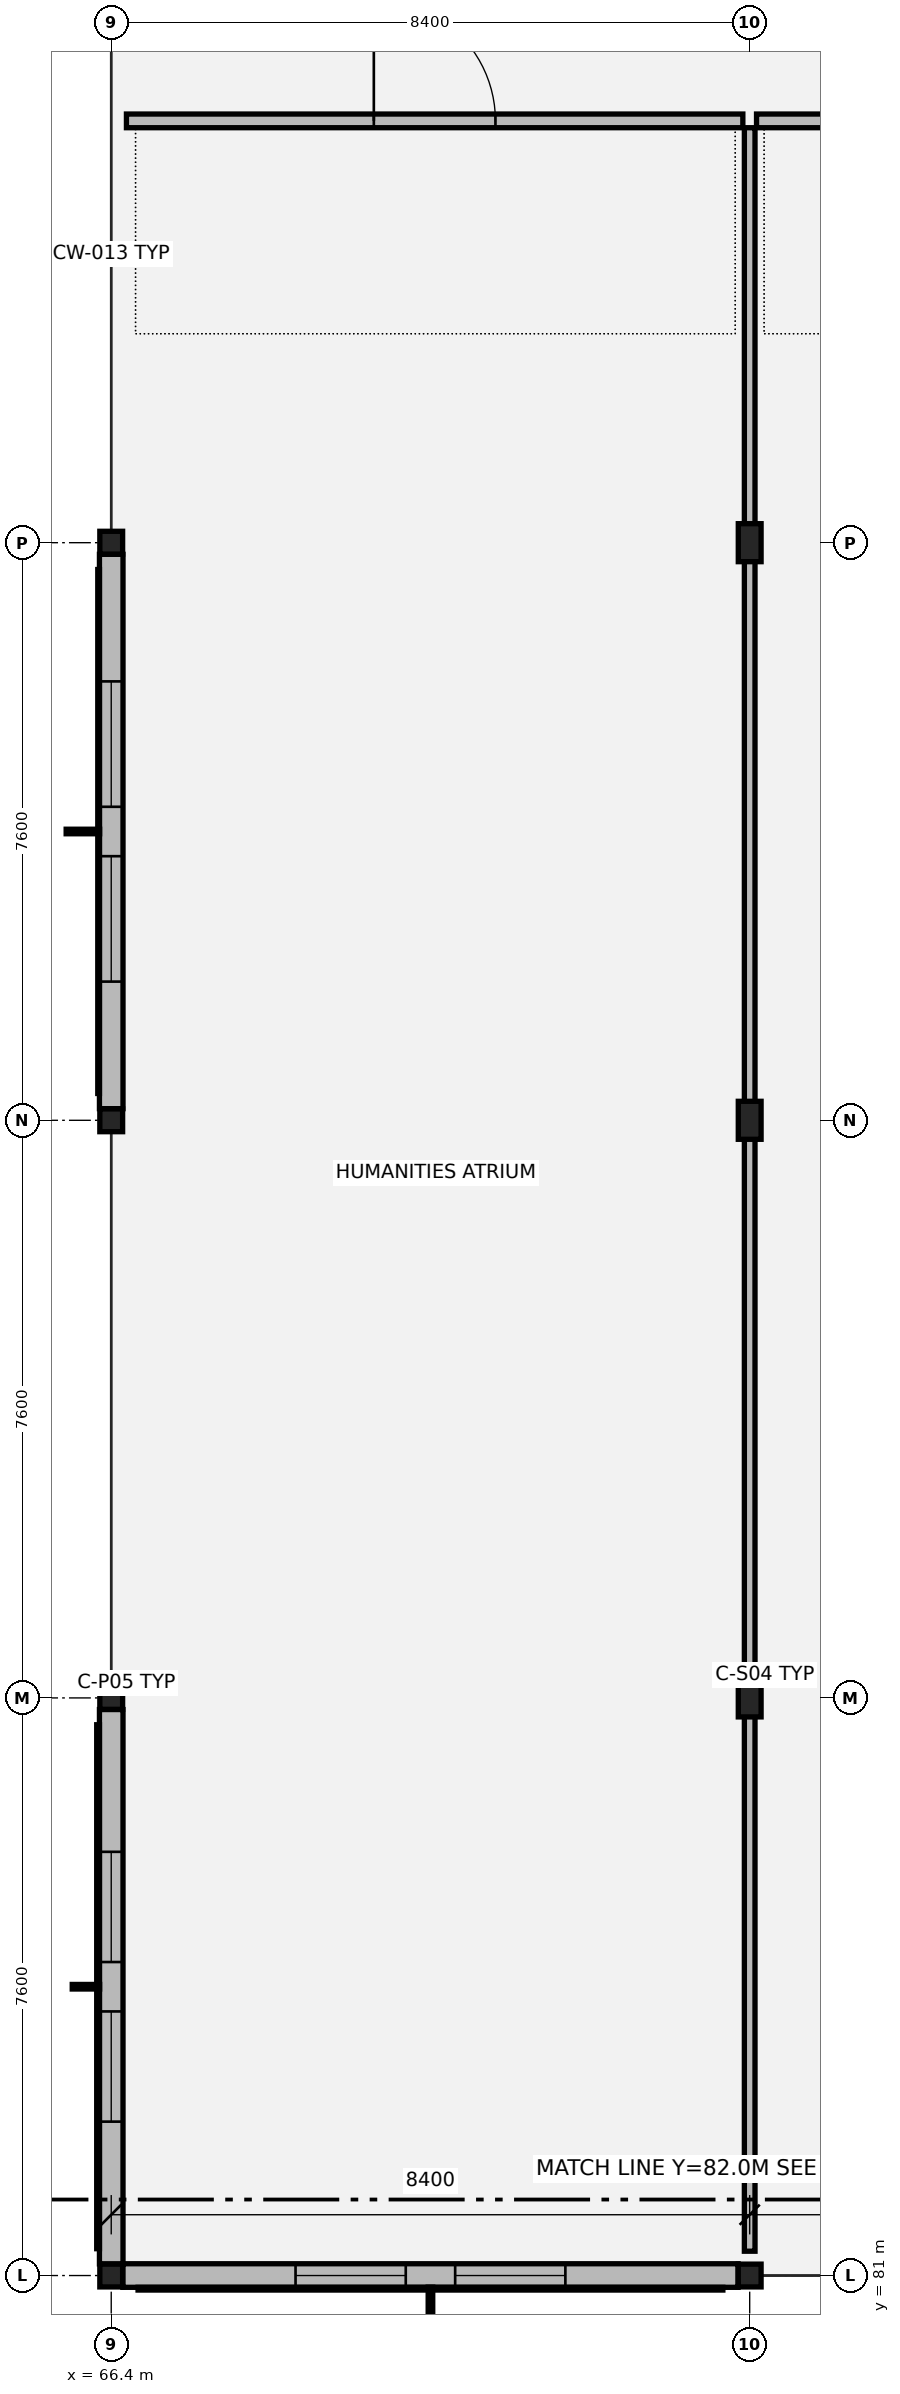
"""IFC4 building model, lengths in metres.
Left out: names, types, materials, properties, quantities, classifications, styles, units other than length and angle.
Written with IfcOpenShell. Run it as: python <this file> out.ifc"""

import sys

from ifc_helpers import new_model, si_unit, direction, frame, frame_2d, origin, origin_2d, place, context, subcontext, project, spatial, rectangle, hollow_rectangle, i_section, extrude, element, fill, save


model = new_model("IFC4")
c1 = context("Model", 3, precision=1e-05, world=origin(), true_north=direction((0.0, 1.0)))
c2 = subcontext(c1, "Body", "Model", "MODEL_VIEW")
j1 = project(units=[si_unit("LENGTHUNIT", "METRE"), si_unit("PLANEANGLEUNIT", "RADIAN")], contexts=[c1])
p1 = place(None, origin())
s1 = spatial("IfcSite", under=j1, at=p1, CompositionType="ELEMENT")
p2 = place(p1, origin())
s2 = spatial("IfcBuilding", under=s1, at=p2, CompositionType="ELEMENT")
p3 = place(p2, frame((0.0, 0.0, 5.1)))
s3 = spatial("IfcBuildingStorey", under=s2, at=p3, CompositionType="ELEMENT", Elevation=5.1)
for number, where, z_axis, x_axis in (
    (1, (66.4, 81.0, 0.0), (0.0, 0.0, 1.0), (1.0, 0.0, 0.0)),
    (2, (66.4, 88.6, 0.0), (0.0, 0.0, 1.0), (1.0, 0.0, 0.0)),
    (3, (66.4, 96.2, 0.0), (0.0, 0.0, 1.0), (1.0, 0.0, 0.0)),
    (4, (66.4, 103.8, 0.0), (0.0, 0.0, 1.0), (1.0, 0.0, 0.0)),
    (5, (74.8, 81.0, 0.0), (0.0, 0.0, 1.0), (1.0, 0.0, 0.0)),
):
    element("IfcColumn", number, at=place(p3, frame(where, z_axis=z_axis, x_axis=x_axis)), inside=s3, PredefinedType="COLUMN", context=c2, shape_type="SweptSolid", body=[
        extrude(hollow_rectangle(XDim=0.3, YDim=0.3, WallThickness=0.012, at=origin_2d()), origin(), (0.0, 0.0, 1.0), 4.055),
    ])
for number, where, z_axis, x_axis in (
    (6, (74.8, 88.6, 0.0), (0.0, 0.0, 1.0), (1.0, 0.0, 0.0)),
    (7, (74.8, 96.2, 0.0), (0.0, 0.0, 1.0), (1.0, 0.0, 0.0)),
    (8, (74.8, 103.8, 0.0), (0.0, 0.0, 1.0), (1.0, 0.0, 0.0)),
):
    element("IfcColumn", number, at=place(p3, frame(where, z_axis=z_axis, x_axis=x_axis)), inside=s3, PredefinedType="COLUMN", context=c2, shape_type="SweptSolid", body=[
        extrude(i_section(OverallWidth=0.3, OverallDepth=0.5, WebThickness=0.014, FlangeThickness=0.028, at=origin_2d()), origin(), (0.0, 0.0, 1.0), 4.055),
    ])
p4 = place(p3, frame((66.553, 81.0, 0.0), z_axis=(0.0, 0.0, 1.0), x_axis=(1.0, 0.0, 0.0)))
e9 = element("IfcWall", 9, at=p4, inside=s3, PredefinedType="SOLIDWALL", context=c2, shape_type="SweptSolid", body=[
    extrude(rectangle(XDim=8.094, YDim=0.31, at=frame_2d((4.047, 0.0))), origin(), (0.0, 0.0, 1.0), 3.48),
])
p5 = place(p4, frame((2.272, 0.0, 0.8)))
e10 = element("IfcOpeningElement", 10, at=p5, cuts=e9, PredefinedType="OPENING", context=c2, shape_type="SweptSolid", body=[
    extrude(rectangle(XDim=1.45, YDim=2.2, at=frame_2d((0.725, 1.1))), frame((0.0, 0.165, 0.0), z_axis=(0.0, -1.0, 0.0), x_axis=(1.0, 0.0, 0.0)), (0.0, 0.0, 1.0), 0.33),
])
p6 = place(p4, frame((4.372, 0.0, 0.8)))
e11 = element("IfcOpeningElement", 11, at=p6, cuts=e9, PredefinedType="OPENING", context=c2, shape_type="SweptSolid", body=[
    extrude(rectangle(XDim=1.45, YDim=2.2, at=frame_2d((0.725, 1.1))), frame((0.0, 0.165, 0.0), z_axis=(0.0, -1.0, 0.0), x_axis=(1.0, 0.0, 0.0)), (0.0, 0.0, 1.0), 0.33),
])
p7 = place(p3, frame((66.4, 103.647, 0.0), z_axis=(0.0, 0.0, 1.0), x_axis=(0.0, -1.0, 0.0)))
e12 = element("IfcWall", 12, at=p7, inside=s3, PredefinedType="SOLIDWALL", context=c2, shape_type="SweptSolid", body=[
    extrude(rectangle(XDim=7.294, YDim=0.31, at=frame_2d((3.647, 0.0))), origin(), (0.0, 0.0, 1.0), 3.48),
])
p8 = place(p7, frame((1.672, 0.0, 0.8)))
e13 = element("IfcOpeningElement", 13, at=p8, cuts=e12, PredefinedType="OPENING", context=c2, shape_type="SweptSolid", body=[
    extrude(rectangle(XDim=1.65, YDim=2.25, at=frame_2d((0.825, 1.125))), frame((0.0, 0.165, 0.0), z_axis=(0.0, -1.0, 0.0), x_axis=(1.0, 0.0, 0.0)), (0.0, 0.0, 1.0), 0.33),
])
p9 = place(p7, frame((3.972, 0.0, 0.8)))
e14 = element("IfcOpeningElement", 14, at=p9, cuts=e12, PredefinedType="OPENING", context=c2, shape_type="SweptSolid", body=[
    extrude(rectangle(XDim=1.65, YDim=2.25, at=frame_2d((0.825, 1.125))), frame((0.0, 0.165, 0.0), z_axis=(0.0, -1.0, 0.0), x_axis=(1.0, 0.0, 0.0)), (0.0, 0.0, 1.0), 0.33),
])
p10 = place(p3, frame((66.4, 88.447, 0.0), z_axis=(0.0, 0.0, 1.0), x_axis=(0.0, -1.0, 0.0)))
e15 = element("IfcWall", 15, at=p10, inside=s3, PredefinedType="SOLIDWALL", context=c2, shape_type="SweptSolid", body=[
    extrude(rectangle(XDim=7.294, YDim=0.31, at=frame_2d((3.647, 0.0))), origin(), (0.0, 0.0, 1.0), 3.48),
])
p11 = place(p10, frame((1.872, 0.0, 0.8)))
e16 = element("IfcOpeningElement", 16, at=p11, cuts=e15, PredefinedType="OPENING", context=c2, shape_type="SweptSolid", body=[
    extrude(rectangle(XDim=1.45, YDim=2.2, at=frame_2d((0.725, 1.1))), frame((0.0, 0.165, 0.0), z_axis=(0.0, -1.0, 0.0), x_axis=(1.0, 0.0, 0.0)), (0.0, 0.0, 1.0), 0.33),
])
p12 = place(p10, frame((3.972, 0.0, 0.8)))
e17 = element("IfcOpeningElement", 17, at=p12, cuts=e15, PredefinedType="OPENING", context=c2, shape_type="SweptSolid", body=[
    extrude(rectangle(XDim=1.45, YDim=2.2, at=frame_2d((0.725, 1.1))), frame((0.0, 0.165, 0.0), z_axis=(0.0, -1.0, 0.0), x_axis=(1.0, 0.0, 0.0)), (0.0, 0.0, 1.0), 0.33),
])
p13 = place(p3, frame((66.6, 109.35, 0.0), z_axis=(0.0, 0.0, 1.0), x_axis=(1.0, 0.0, 0.0)))
e18 = element("IfcWall", 18, at=p13, inside=s3, PredefinedType="PARTITIONING", context=c2, shape_type="SweptSolid", body=[
    extrude(rectangle(XDim=8.11, YDim=0.18, at=frame_2d((4.055, 0.0))), origin(), (0.0, 0.0, 1.0), 3.18),
])
p14 = place(p13, frame((3.255, 0.0, 0.0)))
e19 = element("IfcOpeningElement", 19, at=p14, cuts=e18, PredefinedType="OPENING", context=c2, shape_type="SweptSolid", body=[
    extrude(rectangle(XDim=1.6, YDim=2.25, at=frame_2d((0.8, 1.125))), frame((0.0, 0.1, 0.0), z_axis=(0.0, -1.0, 0.0), x_axis=(1.0, 0.0, 0.0)), (0.0, 0.0, 1.0), 0.2),
])
p15 = place(p3, frame((74.89, 109.35, 0.0), z_axis=(0.0, 0.0, 1.0), x_axis=(1.0, 0.0, 0.0)))
e20 = element("IfcWall", 20, at=p15, inside=s3, PredefinedType="PARTITIONING", context=c2, shape_type="SweptSolid", body=[
    extrude(rectangle(XDim=16.62, YDim=0.18, at=frame_2d((8.31, 0.0))), origin(), (0.0, 0.0, 1.0), 3.18),
])
p16 = place(p15, frame((7.63, 0.0, 0.0)))
e21 = element("IfcOpeningElement", 21, at=p16, cuts=e20, PredefinedType="OPENING", context=c2, shape_type="SweptSolid", body=[
    extrude(rectangle(XDim=1.36, YDim=2.2, at=frame_2d((0.68, 1.1))), frame((0.0, 0.1, 0.0), z_axis=(0.0, -1.0, 0.0), x_axis=(1.0, 0.0, 0.0)), (0.0, 0.0, 1.0), 0.2),
])
p17 = place(p3, frame((74.8, 81.32, 0.0), z_axis=(0.0, 0.0, 1.0), x_axis=(0.0, 1.0, 0.0)))
e22 = element("IfcWall", 22, at=p17, inside=s3, PredefinedType="PARTITIONING", context=c2, shape_type="SweptSolid", body=[
    extrude(rectangle(XDim=27.94, YDim=0.14, at=frame_2d((13.97, 0.0))), origin(), (0.0, 0.0, 1.0), 3.18),
])
p18 = place(p5, origin())
e23 = element("IfcWindow", 23, at=p18, inside=s3, PartitioningType="SINGLE_PANEL", PredefinedType="WINDOW", context=c2, shape_type="SweptSolid", body=[
    extrude(rectangle(XDim=1.45, YDim=2.2, at=frame_2d((0.725, 1.1))), frame((0.0, 0.03, 0.0), z_axis=(0.0, -1.0, 0.0), x_axis=(1.0, 0.0, 0.0)), (0.0, 0.0, 1.0), 0.06),
])
fill(e10, e23)
p19 = place(p6, origin())
e24 = element("IfcWindow", 24, at=p19, inside=s3, PartitioningType="SINGLE_PANEL", PredefinedType="WINDOW", context=c2, shape_type="SweptSolid", body=[
    extrude(rectangle(XDim=1.45, YDim=2.2, at=frame_2d((0.725, 1.1))), frame((0.0, 0.03, 0.0), z_axis=(0.0, -1.0, 0.0), x_axis=(1.0, 0.0, 0.0)), (0.0, 0.0, 1.0), 0.06),
])
fill(e11, e24)
p20 = place(p8, origin())
e25 = element("IfcWindow", 25, at=p20, inside=s3, PartitioningType="SINGLE_PANEL", PredefinedType="WINDOW", context=c2, shape_type="SweptSolid", body=[
    extrude(rectangle(XDim=1.65, YDim=2.25, at=frame_2d((0.825, 1.125))), frame((0.0, 0.03, 0.0), z_axis=(0.0, -1.0, 0.0), x_axis=(1.0, 0.0, 0.0)), (0.0, 0.0, 1.0), 0.06),
])
fill(e13, e25)
p21 = place(p9, origin())
e26 = element("IfcWindow", 26, at=p21, inside=s3, PartitioningType="SINGLE_PANEL", PredefinedType="WINDOW", context=c2, shape_type="SweptSolid", body=[
    extrude(rectangle(XDim=1.65, YDim=2.25, at=frame_2d((0.825, 1.125))), frame((0.0, 0.03, 0.0), z_axis=(0.0, -1.0, 0.0), x_axis=(1.0, 0.0, 0.0)), (0.0, 0.0, 1.0), 0.06),
])
fill(e14, e26)
p22 = place(p11, origin())
e27 = element("IfcWindow", 27, at=p22, inside=s3, PartitioningType="SINGLE_PANEL", PredefinedType="WINDOW", context=c2, shape_type="SweptSolid", body=[
    extrude(rectangle(XDim=1.45, YDim=2.2, at=frame_2d((0.725, 1.1))), frame((0.0, 0.03, 0.0), z_axis=(0.0, -1.0, 0.0), x_axis=(1.0, 0.0, 0.0)), (0.0, 0.0, 1.0), 0.06),
])
fill(e16, e27)
p23 = place(p12, origin())
e28 = element("IfcWindow", 28, at=p23, inside=s3, PartitioningType="SINGLE_PANEL", PredefinedType="WINDOW", context=c2, shape_type="SweptSolid", body=[
    extrude(rectangle(XDim=1.45, YDim=2.2, at=frame_2d((0.725, 1.1))), frame((0.0, 0.03, 0.0), z_axis=(0.0, -1.0, 0.0), x_axis=(1.0, 0.0, 0.0)), (0.0, 0.0, 1.0), 0.06),
])
fill(e17, e28)
p24 = place(p14, origin())
e29 = element("IfcDoor", 29, at=p24, inside=s3, OperationType="DOUBLE_DOOR_SINGLE_SWING", PredefinedType="DOOR", context=c2, shape_type="SweptSolid", body=[
    extrude(rectangle(XDim=1.6, YDim=2.25, at=frame_2d((0.8, 1.125))), frame((0.0, 0.025, 0.0), z_axis=(0.0, -1.0, 0.0), x_axis=(1.0, 0.0, 0.0)), (0.0, 0.0, 1.0), 0.05),
])
fill(e19, e29)
save(model, sys.argv[1])
